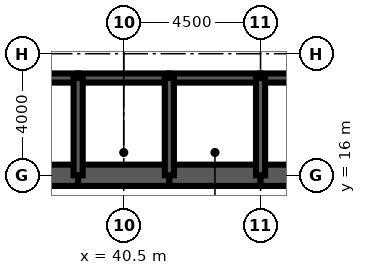
"""IFC4 building model, lengths in metres.
Left out: names, types, materials, properties, quantities, classifications, styles, units other than length and angle.
Written with IfcOpenShell. Run it as: python <this file> out.ifc"""

import sys

from ifc_helpers import new_model, si_unit, direction, frame, frame_2d, origin, place, context, subcontext, project, spatial, rectangle, extrude, element, fill, save


model = new_model("IFC4")
c1 = context("Model", 3, precision=1e-05, world=origin(), true_north=direction((0.0, 1.0)))
c2 = subcontext(c1, "Body", "Model", "MODEL_VIEW")
j1 = project(units=[si_unit("LENGTHUNIT", "METRE"), si_unit("PLANEANGLEUNIT", "RADIAN")], contexts=[c1])
p1 = place(None, origin())
s1 = spatial("IfcSite", under=j1, at=p1, CompositionType="ELEMENT")
p2 = place(p1, origin())
s2 = spatial("IfcBuilding", under=s1, at=p2, CompositionType="ELEMENT")
p3 = place(p2, frame((0.0, 0.0, 279.5)))
s3 = spatial("IfcBuildingStorey", under=s2, at=p3, CompositionType="ELEMENT", Elevation=279.5)
for number, where, z_axis, x_axis in (
    (1, (36.0, 16.0, 0.0), (0.0, 0.0, 1.0), (1.0, 0.0, 0.0)),
    (2, (39.0, 16.0, 0.0), (0.0, 0.0, 1.0), (1.0, 0.0, 0.0)),
    (3, (42.0, 16.0, 0.0), (0.0, 0.0, 1.0), (1.0, 0.0, 0.0)),
):
    element("IfcWall", number, at=place(p3, frame(where, z_axis=z_axis, x_axis=x_axis)), inside=s3, PredefinedType="SHEAR", context=c2, shape_type="SweptSolid", body=[
        extrude(rectangle(XDim=3.0, YDim=0.7, at=frame_2d((1.5, 0.0))), origin(), (0.0, 0.0, 1.0), 4.2),
    ])
p4 = place(p3, frame((45.0, 16.0, 0.0), z_axis=(0.0, 0.0, 1.0), x_axis=(1.0, 0.0, 0.0)))
e4 = element("IfcWall", 4, at=p4, inside=s3, PredefinedType="SHEAR", context=c2, shape_type="SweptSolid", body=[
    extrude(rectangle(XDim=9.35, YDim=0.7, at=frame_2d((4.675, 0.0))), origin(), (0.0, 0.0, 1.0), 4.2),
])
p5 = place(p3, frame((36.0, 19.2, 0.0), z_axis=(0.0, 0.0, 1.0), x_axis=(1.0, 0.0, 0.0)))
e5 = element("IfcWall", 5, at=p5, inside=s3, PredefinedType="SOLIDWALL", context=c2, shape_type="SweptSolid", body=[
    extrude(rectangle(XDim=3.0, YDim=0.3, at=frame_2d((1.5, 0.0))), origin(), (0.0, 0.0, 1.0), 4.2),
])
p6 = place(p5, frame((0.95, 0.0, 0.0)))
e6 = element("IfcOpeningElement", 6, at=p6, cuts=e5, PredefinedType="OPENING", context=c2, shape_type="SweptSolid", body=[
    extrude(rectangle(XDim=1.1, YDim=2.2, at=frame_2d((0.55, 1.1))), frame((0.0, 0.16, 0.0), z_axis=(0.0, -1.0, 0.0), x_axis=(1.0, 0.0, 0.0)), (0.0, 0.0, 1.0), 0.32),
])
p7 = place(p3, frame((39.0, 19.2, 0.0), z_axis=(0.0, 0.0, 1.0), x_axis=(1.0, 0.0, 0.0)))
e7 = element("IfcWall", 7, at=p7, inside=s3, PredefinedType="SOLIDWALL", context=c2, shape_type="SweptSolid", body=[
    extrude(rectangle(XDim=3.0, YDim=0.3, at=frame_2d((1.5, 0.0))), origin(), (0.0, 0.0, 1.0), 4.2),
])
p8 = place(p7, frame((1.0, 0.0, 0.0)))
e8 = element("IfcOpeningElement", 8, at=p8, cuts=e7, PredefinedType="OPENING", context=c2, shape_type="SweptSolid", body=[
    extrude(rectangle(XDim=1.0, YDim=2.1, at=frame_2d((0.5, 1.05))), frame((0.0, 0.16, 0.0), z_axis=(0.0, -1.0, 0.0), x_axis=(1.0, 0.0, 0.0)), (0.0, 0.0, 1.0), 0.32),
])
p9 = place(p3, frame((42.0, 19.2, 0.0), z_axis=(0.0, 0.0, 1.0), x_axis=(1.0, 0.0, 0.0)))
e9 = element("IfcWall", 9, at=p9, inside=s3, PredefinedType="SOLIDWALL", context=c2, shape_type="SweptSolid", body=[
    extrude(rectangle(XDim=3.0, YDim=0.3, at=frame_2d((1.5, 0.0))), origin(), (0.0, 0.0, 1.0), 4.2),
])
p10 = place(p9, frame((1.0, 0.0, 0.0)))
e10 = element("IfcOpeningElement", 10, at=p10, cuts=e9, PredefinedType="OPENING", context=c2, shape_type="SweptSolid", body=[
    extrude(rectangle(XDim=1.0, YDim=2.1, at=frame_2d((0.5, 1.05))), frame((0.0, 0.16, 0.0), z_axis=(0.0, -1.0, 0.0), x_axis=(1.0, 0.0, 0.0)), (0.0, 0.0, 1.0), 0.32),
])
p11 = place(p3, frame((45.0, 19.2, 0.0), z_axis=(0.0, 0.0, 1.0), x_axis=(1.0, 0.0, 0.0)))
e11 = element("IfcWall", 11, at=p11, inside=s3, PredefinedType="SOLIDWALL", context=c2, shape_type="SweptSolid", body=[
    extrude(rectangle(XDim=9.0, YDim=0.3, at=frame_2d((4.5, 0.0))), origin(), (0.0, 0.0, 1.0), 4.2),
])
p12 = place(p11, frame((7.35, 0.0, 0.0)))
e12 = element("IfcOpeningElement", 12, at=p12, cuts=e11, PredefinedType="OPENING", context=c2, shape_type="SweptSolid", body=[
    extrude(rectangle(XDim=1.0, YDim=2.1, at=frame_2d((0.5, 1.05))), frame((0.0, 0.16, 0.0), z_axis=(0.0, -1.0, 0.0), x_axis=(1.0, 0.0, 0.0)), (0.0, 0.0, 1.0), 0.32),
])
for number, where, z_axis, x_axis in (
    (13, (39.0, 16.0, 0.0), (0.0, 0.0, 1.0), (0.0, 1.0, 0.0)),
    (14, (42.0, 16.0, 0.0), (0.0, 0.0, 1.0), (0.0, 1.0, 0.0)),
    (15, (45.0, 16.0, 0.0), (0.0, 0.0, 1.0), (0.0, 1.0, 0.0)),
):
    element("IfcWall", number, at=place(p3, frame(where, z_axis=z_axis, x_axis=x_axis)), inside=s3, PredefinedType="SOLIDWALL", context=c2, shape_type="SweptSolid", body=[
        extrude(rectangle(XDim=3.2, YDim=0.3, at=frame_2d((1.6, 0.0))), origin(), (0.0, 0.0, 1.0), 4.2),
    ])
p13 = place(p3, frame((39.15, 17.3, 0.0), z_axis=(0.0, 0.0, 1.0), x_axis=(1.0, 0.0, 0.0)))
e16 = element("IfcWall", 16, at=p13, inside=s3, PredefinedType="SOLIDWALL", context=c2, shape_type="SweptSolid", body=[
    extrude(rectangle(XDim=2.7, YDim=0.3, at=frame_2d((1.35, 0.0))), origin(), (0.0, 0.0, 1.0), 4.04),
])
p14 = place(p13, frame((0.85, 0.0, 0.0)))
e17 = element("IfcOpeningElement", 17, at=p14, cuts=e16, PredefinedType="OPENING", context=c2, shape_type="SweptSolid", body=[
    extrude(rectangle(XDim=1.0, YDim=2.1, at=frame_2d((0.5, 1.05))), frame((0.0, 0.16, 0.0), z_axis=(0.0, -1.0, 0.0), x_axis=(1.0, 0.0, 0.0)), (0.0, 0.0, 1.0), 0.32),
])
p15 = place(p3, frame((42.15, 17.3, 0.0), z_axis=(0.0, 0.0, 1.0), x_axis=(1.0, 0.0, 0.0)))
e18 = element("IfcWall", 18, at=p15, inside=s3, PredefinedType="SOLIDWALL", context=c2, shape_type="SweptSolid", body=[
    extrude(rectangle(XDim=2.7, YDim=0.3, at=frame_2d((1.35, 0.0))), origin(), (0.0, 0.0, 1.0), 4.04),
])
p16 = place(p15, frame((0.85, 0.0, 0.0)))
e19 = element("IfcOpeningElement", 19, at=p16, cuts=e18, PredefinedType="OPENING", context=c2, shape_type="SweptSolid", body=[
    extrude(rectangle(XDim=1.0, YDim=2.1, at=frame_2d((0.5, 1.05))), frame((0.0, 0.16, 0.0), z_axis=(0.0, -1.0, 0.0), x_axis=(1.0, 0.0, 0.0)), (0.0, 0.0, 1.0), 0.32),
])
p17 = place(p14, origin())
e20 = element("IfcDoor", 20, at=p17, inside=s3, OperationType="SINGLE_SWING_LEFT", PredefinedType="DOOR", context=c2, shape_type="SweptSolid", body=[
    extrude(rectangle(XDim=1.0, YDim=2.1, at=frame_2d((0.5, 1.05))), frame((0.0, 0.025, 0.0), z_axis=(0.0, -1.0, 0.0), x_axis=(1.0, 0.0, 0.0)), (0.0, 0.0, 1.0), 0.05),
])
fill(e17, e20)
p18 = place(p16, origin())
e21 = element("IfcDoor", 21, at=p18, inside=s3, OperationType="SINGLE_SWING_LEFT", PredefinedType="DOOR", context=c2, shape_type="SweptSolid", body=[
    extrude(rectangle(XDim=1.0, YDim=2.1, at=frame_2d((0.5, 1.05))), frame((0.0, 0.025, 0.0), z_axis=(0.0, -1.0, 0.0), x_axis=(1.0, 0.0, 0.0)), (0.0, 0.0, 1.0), 0.05),
])
fill(e19, e21)
p19 = place(p8, origin())
e22 = element("IfcDoor", 22, at=p19, inside=s3, OperationType="SINGLE_SWING_LEFT", PredefinedType="DOOR", context=c2, shape_type="SweptSolid", body=[
    extrude(rectangle(XDim=1.0, YDim=2.1, at=frame_2d((0.5, 1.05))), frame((0.0, 0.025, 0.0), z_axis=(0.0, -1.0, 0.0), x_axis=(1.0, 0.0, 0.0)), (0.0, 0.0, 1.0), 0.05),
])
fill(e8, e22)
p20 = place(p10, origin())
e23 = element("IfcDoor", 23, at=p20, inside=s3, OperationType="SINGLE_SWING_LEFT", PredefinedType="DOOR", context=c2, shape_type="SweptSolid", body=[
    extrude(rectangle(XDim=1.0, YDim=2.1, at=frame_2d((0.5, 1.05))), frame((0.0, 0.025, 0.0), z_axis=(0.0, -1.0, 0.0), x_axis=(1.0, 0.0, 0.0)), (0.0, 0.0, 1.0), 0.05),
])
fill(e10, e23)
save(model, sys.argv[1])
